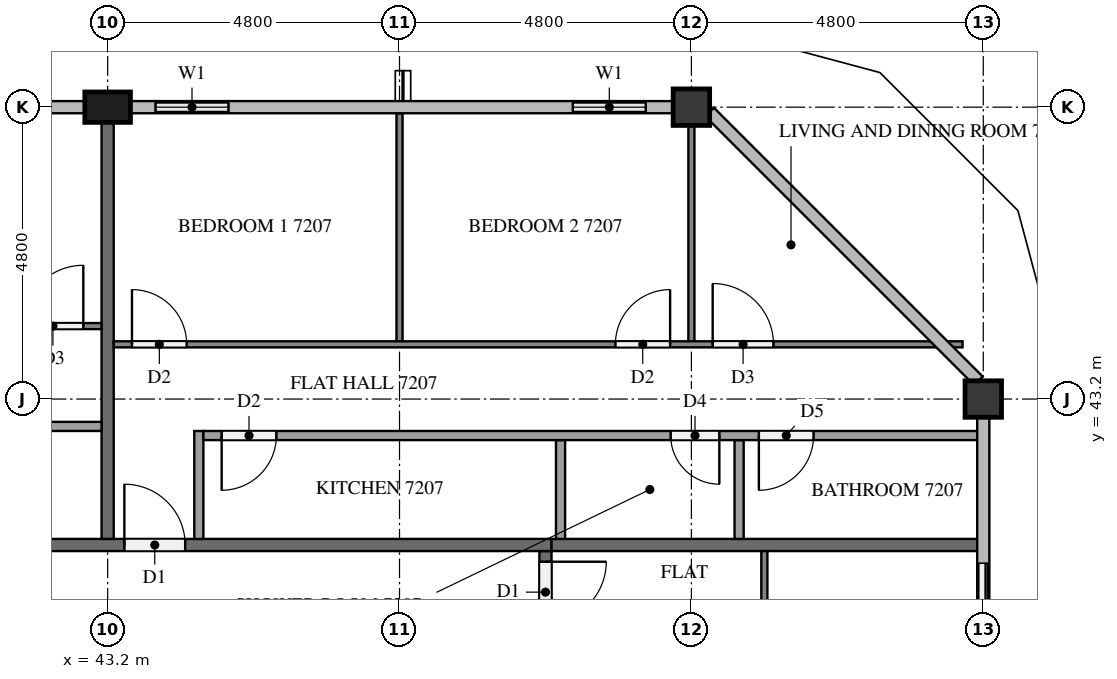
"""IFC4 building model, lengths in metres.
Left out: names, types, materials, properties, quantities, classifications, styles, units other than length and angle.
Written with IfcOpenShell. Run it as: python <this file> out.ifc"""

import sys

from ifc_helpers import new_model, si_unit, direction, frame, frame_2d, origin, origin_2d, place, context, subcontext, project, spatial, rectangle, extrude, element, fill, save


model = new_model("IFC4")
c1 = context("Model", 3, precision=1e-05, world=origin(), true_north=direction((0.0, 1.0)))
c2 = subcontext(c1, "Body", "Model", "MODEL_VIEW")
j1 = project(units=[si_unit("LENGTHUNIT", "METRE"), si_unit("PLANEANGLEUNIT", "RADIAN")], contexts=[c1])
p1 = place(None, origin())
s1 = spatial("IfcSite", under=j1, at=p1, CompositionType="ELEMENT")
p2 = place(p1, origin())
s2 = spatial("IfcBuilding", under=s1, at=p2, CompositionType="ELEMENT")
p3 = place(p2, frame((0.0, 0.0, 275.6)))
s3 = spatial("IfcBuildingStorey", under=s2, at=p3, CompositionType="ELEMENT", Elevation=275.6)
for number, where, z_axis, x_axis in (
    (1, (57.6, 43.2, 0.0), (0.0, 0.0, 1.0), (1.0, 0.0, 0.0)),
    (2, (52.8, 48.0, 0.0), (0.0, 0.0, 1.0), (1.0, 0.0, 0.0)),
):
    element("IfcColumn", number, at=place(p3, frame(where, z_axis=z_axis, x_axis=x_axis)), inside=s3, PredefinedType="COLUMN", context=c2, shape_type="SweptSolid", body=[
        extrude(rectangle(XDim=0.6, YDim=0.6, at=origin_2d()), origin(), (0.0, 0.0, 1.0), 3.2),
    ])
p4 = place(p3, frame((43.2, 48.0, 0.0), z_axis=(0.0, 0.0, 1.0), x_axis=(1.0, 0.0, 0.0)))
e3 = element("IfcColumn", 3, at=p4, inside=s3, PredefinedType="COLUMN", context=c2, shape_type="SweptSolid", body=[
    extrude(rectangle(XDim=0.75, YDim=0.5, at=origin_2d()), origin(), (0.0, 0.0, 1.0), 3.2),
])
p5 = place(p3, frame((57.6, 38.4, 0.0), z_axis=(0.0, 0.0, 1.0), x_axis=(0.0, 1.0, 0.0)))
e4 = element("IfcWall", 4, at=p5, inside=s3, PredefinedType="SOLIDWALL", context=c2, shape_type="SweptSolid", body=[
    extrude(rectangle(XDim=2.4, YDim=0.15, at=frame_2d((1.2, 0.0))), origin(), (0.0, 0.0, 1.0), 3.2),
])
p6 = place(p5, frame((0.3, 0.0, 0.0)))
e5 = element("IfcOpeningElement", 5, at=p6, cuts=e4, PredefinedType="OPENING", context=c2, shape_type="SweptSolid", body=[
    extrude(rectangle(XDim=1.8, YDim=2.4, at=frame_2d((0.9, 1.2))), frame((0.0, 0.085, 0.0), z_axis=(0.0, -1.0, 0.0), x_axis=(1.0, 0.0, 0.0)), (0.0, 0.0, 1.0), 0.17),
])
p7 = place(p3, frame((52.5, 48.0, 0.0), z_axis=(0.0, 0.0, 1.0), x_axis=(-1.0, 0.0, 0.0)))
e6 = element("IfcWall", 6, at=p7, inside=s3, PredefinedType="SOLIDWALL", context=c2, shape_type="SweptSolid", body=[
    extrude(rectangle(XDim=2.1, YDim=0.15, at=frame_2d((1.05, 0.0))), origin(), (0.0, 0.0, 1.0), 3.2),
])
p8 = place(p7, frame((0.45, 0.0, 0.9)))
e7 = element("IfcOpeningElement", 7, at=p8, cuts=e6, PredefinedType="OPENING", context=c2, shape_type="SweptSolid", body=[
    extrude(rectangle(XDim=1.2, YDim=1.4, at=frame_2d((0.6, 0.7))), frame((0.0, 0.085, 0.0), z_axis=(0.0, -1.0, 0.0), x_axis=(1.0, 0.0, 0.0)), (0.0, 0.0, 1.0), 0.17),
])
p9 = place(p3, frame((45.6, 48.0, 0.0), z_axis=(0.0, 0.0, 1.0), x_axis=(-1.0, 0.0, 0.0)))
e8 = element("IfcWall", 8, at=p9, inside=s3, PredefinedType="SOLIDWALL", context=c2, shape_type="SweptSolid", body=[
    extrude(rectangle(XDim=2.025, YDim=0.15, at=frame_2d((1.013, 0.0))), origin(), (0.0, 0.0, 1.0), 3.2),
])
p10 = place(p9, frame((0.413, 0.0, 0.9)))
e9 = element("IfcOpeningElement", 9, at=p10, cuts=e8, PredefinedType="OPENING", context=c2, shape_type="SweptSolid", body=[
    extrude(rectangle(XDim=1.2, YDim=1.4, at=frame_2d((0.6, 0.7))), frame((0.0, 0.085, 0.0), z_axis=(0.0, -1.0, 0.0), x_axis=(1.0, 0.0, 0.0)), (0.0, 0.0, 1.0), 0.17),
])
p11 = place(p3, frame((50.4, 40.7, 0.0), z_axis=(0.0, 0.0, 1.0), x_axis=(0.0, -1.0, 0.0)))
e10 = element("IfcWall", 10, at=p11, inside=s3, PredefinedType="PARTITIONING", context=c2, shape_type="SweptSolid", body=[
    extrude(rectangle(XDim=28.6, YDim=0.2, at=frame_2d((14.3, 0.0))), origin(), (0.0, 0.0, 1.0), 3.2),
])
p12 = place(p11, frame((27.425, 0.0, 0.0)))
e11 = element("IfcOpeningElement", 11, at=p12, cuts=e10, PredefinedType="OPENING", context=c2, shape_type="SweptSolid", body=[
    extrude(rectangle(XDim=1.0, YDim=2.1, at=frame_2d((0.5, 1.05))), frame((0.0, 0.11, 0.0), z_axis=(0.0, -1.0, 0.0), x_axis=(1.0, 0.0, 0.0)), (0.0, 0.0, 1.0), 0.22),
])
p13 = place(p11, frame((0.175, 0.0, 0.0)))
e12 = element("IfcOpeningElement", 12, at=p13, cuts=e10, PredefinedType="OPENING", context=c2, shape_type="SweptSolid", body=[
    extrude(rectangle(XDim=1.0, YDim=2.1, at=frame_2d((0.5, 1.05))), frame((0.0, 0.11, 0.0), z_axis=(0.0, -1.0, 0.0), x_axis=(1.0, 0.0, 0.0)), (0.0, 0.0, 1.0), 0.22),
])
p14 = place(p3, frame((11.9, 40.8, 0.0), z_axis=(0.0, 0.0, 1.0), x_axis=(1.0, 0.0, 0.0)))
e13 = element("IfcWall", 13, at=p14, inside=s3, PredefinedType="PARTITIONING", context=c2, shape_type="SweptSolid", body=[
    extrude(rectangle(XDim=38.6, YDim=0.2, at=frame_2d((19.3, 0.0))), origin(), (0.0, 0.0, 1.0), 3.2),
])
p15 = place(p14, frame((31.575, 0.0, 0.0)))
e14 = element("IfcOpeningElement", 14, at=p15, cuts=e13, PredefinedType="OPENING", context=c2, shape_type="SweptSolid", body=[
    extrude(rectangle(XDim=1.0, YDim=2.1, at=frame_2d((0.5, 1.05))), frame((0.0, 0.11, 0.0), z_axis=(0.0, -1.0, 0.0), x_axis=(1.0, 0.0, 0.0)), (0.0, 0.0, 1.0), 0.22),
])
p16 = place(p14, frame((24.375, 0.0, 0.0)))
e15 = element("IfcOpeningElement", 15, at=p16, cuts=e13, PredefinedType="OPENING", context=c2, shape_type="SweptSolid", body=[
    extrude(rectangle(XDim=1.0, YDim=2.1, at=frame_2d((0.5, 1.05))), frame((0.0, 0.11, 0.0), z_axis=(0.0, -1.0, 0.0), x_axis=(1.0, 0.0, 0.0)), (0.0, 0.0, 1.0), 0.22),
])
p17 = place(p14, frame((22.825, 0.0, 0.0)))
e16 = element("IfcOpeningElement", 16, at=p17, cuts=e13, PredefinedType="OPENING", context=c2, shape_type="SweptSolid", body=[
    extrude(rectangle(XDim=1.0, YDim=2.1, at=frame_2d((0.5, 1.05))), frame((0.0, 0.11, 0.0), z_axis=(0.0, -1.0, 0.0), x_axis=(1.0, 0.0, 0.0)), (0.0, 0.0, 1.0), 0.22),
])
p18 = place(p14, frame((0.375, 0.0, 0.0)))
e17 = element("IfcOpeningElement", 17, at=p18, cuts=e13, PredefinedType="OPENING", context=c2, shape_type="SweptSolid", body=[
    extrude(rectangle(XDim=1.0, YDim=2.1, at=frame_2d((0.5, 1.05))), frame((0.0, 0.11, 0.0), z_axis=(0.0, -1.0, 0.0), x_axis=(1.0, 0.0, 0.0)), (0.0, 0.0, 1.0), 0.22),
])
p19 = place(p3, frame((50.5, 40.8, 0.0), z_axis=(0.0, 0.0, 1.0), x_axis=(1.0, 0.0, 0.0)))
e18 = element("IfcWall", 18, at=p19, inside=s3, PredefinedType="PARTITIONING", context=c2, shape_type="SweptSolid", body=[
    extrude(rectangle(XDim=7.0, YDim=0.2, at=frame_2d((3.5, 0.0))), origin(), (0.0, 0.0, 1.0), 3.2),
])
p20 = place(p3, frame((43.2, 47.75, 0.0), z_axis=(0.0, 0.0, 1.0), x_axis=(0.0, -1.0, 0.0)))
e19 = element("IfcWall", 19, at=p20, inside=s3, PredefinedType="PARTITIONING", context=c2, shape_type="SweptSolid", body=[
    extrude(rectangle(XDim=6.85, YDim=0.2, at=frame_2d((3.425, 0.0))), origin(), (0.0, 0.0, 1.0), 3.2),
])
p21 = place(p3, frame((54.0, 40.7, 0.0), z_axis=(0.0, 0.0, 1.0), x_axis=(0.0, -1.0, 0.0)))
e20 = element("IfcWall", 20, at=p21, inside=s3, PredefinedType="PARTITIONING", context=c2, shape_type="SweptSolid", body=[
    extrude(rectangle(XDim=11.8, YDim=0.1, at=frame_2d((5.9, 0.0))), origin(), (0.0, 0.0, 1.0), 3.2),
])
p22 = place(p21, frame((5.75, 0.0, 0.0)))
e21 = element("IfcOpeningElement", 21, at=p22, cuts=e20, PredefinedType="OPENING", context=c2, shape_type="SweptSolid", body=[
    extrude(rectangle(XDim=1.0, YDim=2.1, at=frame_2d((0.5, 1.05))), frame((0.0, 0.06, 0.0), z_axis=(0.0, -1.0, 0.0), x_axis=(1.0, 0.0, 0.0)), (0.0, 0.0, 1.0), 0.12),
])
p23 = place(p21, frame((7.45, 0.0, 0.0)))
e22 = element("IfcOpeningElement", 22, at=p23, cuts=e20, PredefinedType="OPENING", context=c2, shape_type="SweptSolid", body=[
    extrude(rectangle(XDim=0.9, YDim=2.1, at=frame_2d((0.45, 1.05))), frame((0.0, 0.06, 0.0), z_axis=(0.0, -1.0, 0.0), x_axis=(1.0, 0.0, 0.0)), (0.0, 0.0, 1.0), 0.12),
])
p24 = place(p3, frame((48.0, 44.15, 0.0), z_axis=(0.0, 0.0, 1.0), x_axis=(0.0, 1.0, 0.0)))
e23 = element("IfcWall", 23, at=p24, inside=s3, PredefinedType="PARTITIONING", context=c2, shape_type="SweptSolid", body=[
    extrude(rectangle(XDim=3.75, YDim=0.1, at=frame_2d((1.875, 0.0))), origin(), (0.0, 0.0, 1.0), 3.2),
])
p25 = place(p3, frame((52.8, 44.15, 0.0), z_axis=(0.0, 0.0, 1.0), x_axis=(0.0, 1.0, 0.0)))
e24 = element("IfcWall", 24, at=p25, inside=s3, PredefinedType="PARTITIONING", context=c2, shape_type="SweptSolid", body=[
    extrude(rectangle(XDim=3.55, YDim=0.1, at=frame_2d((1.775, 0.0))), origin(), (0.0, 0.0, 1.0), 3.2),
])
p26 = place(p3, frame((43.3, 44.1, 0.0), z_axis=(0.0, 0.0, 1.0), x_axis=(1.0, 0.0, 0.0)))
e25 = element("IfcWall", 25, at=p26, inside=s3, PredefinedType="PARTITIONING", context=c2, shape_type="SweptSolid", body=[
    extrude(rectangle(XDim=13.959, YDim=0.1, at=frame_2d((6.979, 0.0))), origin(), (0.0, 0.0, 1.0), 3.2),
])
p27 = place(p26, frame((0.3, 0.0, 0.0)))
e26 = element("IfcOpeningElement", 26, at=p27, cuts=e25, PredefinedType="OPENING", context=c2, shape_type="SweptSolid", body=[
    extrude(rectangle(XDim=0.9, YDim=2.1, at=frame_2d((0.45, 1.05))), frame((0.0, 0.06, 0.0), z_axis=(0.0, -1.0, 0.0), x_axis=(1.0, 0.0, 0.0)), (0.0, 0.0, 1.0), 0.12),
])
p28 = place(p26, frame((8.25, 0.0, 0.0)))
e27 = element("IfcOpeningElement", 27, at=p28, cuts=e25, PredefinedType="OPENING", context=c2, shape_type="SweptSolid", body=[
    extrude(rectangle(XDim=0.9, YDim=2.1, at=frame_2d((0.45, 1.05))), frame((0.0, 0.06, 0.0), z_axis=(0.0, -1.0, 0.0), x_axis=(1.0, 0.0, 0.0)), (0.0, 0.0, 1.0), 0.12),
])
p29 = place(p26, frame((9.85, 0.0, 0.0)))
e28 = element("IfcOpeningElement", 28, at=p29, cuts=e25, PredefinedType="OPENING", context=c2, shape_type="SweptSolid", body=[
    extrude(rectangle(XDim=1.0, YDim=2.1, at=frame_2d((0.5, 1.05))), frame((0.0, 0.06, 0.0), z_axis=(0.0, -1.0, 0.0), x_axis=(1.0, 0.0, 0.0)), (0.0, 0.0, 1.0), 0.12),
])
for number, where, z_axis, x_axis in (
    (29, (50.648, 40.9, 0.0), (0.0, 0.0, 1.0), (0.0, 1.0, 0.0)),
    (30, (53.585, 40.9, 0.0), (0.0, 0.0, 1.0), (0.0, 1.0, 0.0)),
):
    element("IfcWall", number, at=place(p3, frame(where, z_axis=z_axis, x_axis=x_axis)), inside=s3, PredefinedType="PARTITIONING", context=c2, shape_type="SweptSolid", body=[
        extrude(rectangle(XDim=1.625, YDim=0.15, at=frame_2d((0.812, 0.0))), origin(), (0.0, 0.0, 1.0), 3.2),
    ])
p30 = place(p3, frame((44.7, 40.9, 0.0), z_axis=(0.0, 0.0, 1.0), x_axis=(0.0, 1.0, 0.0)))
e31 = element("IfcWall", 31, at=p30, inside=s3, PredefinedType="PARTITIONING", context=c2, shape_type="SweptSolid", body=[
    extrude(rectangle(XDim=1.775, YDim=0.15, at=frame_2d((0.888, 0.0))), origin(), (0.0, 0.0, 1.0), 3.2),
])
p31 = place(p3, frame((57.5, 42.6, 0.0), z_axis=(0.0, 0.0, 1.0), x_axis=(-1.0, 0.0, 0.0)))
e32 = element("IfcWall", 32, at=p31, inside=s3, PredefinedType="PARTITIONING", context=c2, shape_type="SweptSolid", body=[
    extrude(rectangle(XDim=12.725, YDim=0.15, at=frame_2d((6.363, 0.0))), origin(), (0.0, 0.0, 1.0), 3.2),
])
p32 = place(p31, frame((11.525, 0.0, 0.0)))
e33 = element("IfcOpeningElement", 33, at=p32, cuts=e32, PredefinedType="OPENING", context=c2, shape_type="SweptSolid", body=[
    extrude(rectangle(XDim=0.9, YDim=2.1, at=frame_2d((0.45, 1.05))), frame((0.0, 0.085, 0.0), z_axis=(0.0, -1.0, 0.0), x_axis=(1.0, 0.0, 0.0)), (0.0, 0.0, 1.0), 0.17),
])
p33 = place(p31, frame((4.24, 0.0, 0.0)))
e34 = element("IfcOpeningElement", 34, at=p33, cuts=e32, PredefinedType="OPENING", context=c2, shape_type="SweptSolid", body=[
    extrude(rectangle(XDim=0.8, YDim=2.1, at=frame_2d((0.4, 1.05))), frame((0.0, 0.085, 0.0), z_axis=(0.0, -1.0, 0.0), x_axis=(1.0, 0.0, 0.0)), (0.0, 0.0, 1.0), 0.17),
])
p34 = place(p31, frame((2.69, 0.0, 0.0)))
e35 = element("IfcOpeningElement", 35, at=p34, cuts=e32, PredefinedType="OPENING", context=c2, shape_type="SweptSolid", body=[
    extrude(rectangle(XDim=0.9, YDim=2.1, at=frame_2d((0.45, 1.05))), frame((0.0, 0.085, 0.0), z_axis=(0.0, -1.0, 0.0), x_axis=(1.0, 0.0, 0.0)), (0.0, 0.0, 1.0), 0.17),
])
p35 = place(p3, frame((36.1, 44.4, 0.0), z_axis=(0.0, 0.0, 1.0), x_axis=(1.0, 0.0, 0.0)))
e36 = element("IfcWall", 36, at=p35, inside=s3, PredefinedType="PARTITIONING", context=c2, shape_type="SweptSolid", body=[
    extrude(rectangle(XDim=7.0, YDim=0.1, at=frame_2d((3.5, 0.0))), origin(), (0.0, 0.0, 1.0), 3.2),
])
p36 = place(p35, frame((5.7, 0.0, 0.0)))
e37 = element("IfcOpeningElement", 37, at=p36, cuts=e36, PredefinedType="OPENING", context=c2, shape_type="SweptSolid", body=[
    extrude(rectangle(XDim=1.0, YDim=2.1, at=frame_2d((0.5, 1.05))), frame((0.0, 0.06, 0.0), z_axis=(0.0, -1.0, 0.0), x_axis=(1.0, 0.0, 0.0)), (0.0, 0.0, 1.0), 0.12),
])
p37 = place(p3, frame((43.1, 42.75, 0.0), z_axis=(0.0, 0.0, 1.0), x_axis=(-1.0, 0.0, 0.0)))
e38 = element("IfcWall", 38, at=p37, inside=s3, PredefinedType="PARTITIONING", context=c2, shape_type="SweptSolid", body=[
    extrude(rectangle(XDim=5.525, YDim=0.15, at=frame_2d((2.763, 0.0))), origin(), (0.0, 0.0, 1.0), 3.2),
])
p38 = place(p37, frame((3.64, 0.0, 0.0)))
e39 = element("IfcOpeningElement", 39, at=p38, cuts=e38, PredefinedType="OPENING", context=c2, shape_type="SweptSolid", body=[
    extrude(rectangle(XDim=0.8, YDim=2.1, at=frame_2d((0.4, 1.05))), frame((0.0, 0.085, 0.0), z_axis=(0.0, -1.0, 0.0), x_axis=(1.0, 0.0, 0.0)), (0.0, 0.0, 1.0), 0.17),
])
p39 = place(p37, frame((2.09, 0.0, 0.0)))
e40 = element("IfcOpeningElement", 40, at=p39, cuts=e38, PredefinedType="OPENING", context=c2, shape_type="SweptSolid", body=[
    extrude(rectangle(XDim=0.9, YDim=2.1, at=frame_2d((0.45, 1.05))), frame((0.0, 0.085, 0.0), z_axis=(0.0, -1.0, 0.0), x_axis=(1.0, 0.0, 0.0)), (0.0, 0.0, 1.0), 0.17),
])
p40 = place(p6, origin())
e41 = element("IfcDoor", 41, at=p40, inside=s3, OperationType="SLIDING_TO_LEFT", PredefinedType="DOOR", context=c2, shape_type="SweptSolid", body=[
    extrude(rectangle(XDim=1.8, YDim=2.4, at=frame_2d((0.9, 1.2))), frame((0.0, 0.025, 0.0), z_axis=(0.0, -1.0, 0.0), x_axis=(1.0, 0.0, 0.0)), (0.0, 0.0, 1.0), 0.05),
])
fill(e5, e41)
p41 = place(p8, origin())
e42 = element("IfcWindow", 42, at=p41, inside=s3, PartitioningType="SINGLE_PANEL", PredefinedType="WINDOW", context=c2, shape_type="SweptSolid", body=[
    extrude(rectangle(XDim=1.2, YDim=1.4, at=frame_2d((0.6, 0.7))), frame((0.0, 0.03, 0.0), z_axis=(0.0, -1.0, 0.0), x_axis=(1.0, 0.0, 0.0)), (0.0, 0.0, 1.0), 0.06),
])
fill(e7, e42)
p42 = place(p10, origin())
e43 = element("IfcWindow", 43, at=p42, inside=s3, PartitioningType="SINGLE_PANEL", PredefinedType="WINDOW", context=c2, shape_type="SweptSolid", body=[
    extrude(rectangle(XDim=1.2, YDim=1.4, at=frame_2d((0.6, 0.7))), frame((0.0, 0.03, 0.0), z_axis=(0.0, -1.0, 0.0), x_axis=(1.0, 0.0, 0.0)), (0.0, 0.0, 1.0), 0.06),
])
fill(e9, e43)
p43 = place(p13, origin())
e44 = element("IfcDoor", 44, at=p43, inside=s3, OperationType="SINGLE_SWING_LEFT", PredefinedType="DOOR", context=c2, shape_type="SweptSolid", body=[
    extrude(rectangle(XDim=1.0, YDim=2.1, at=frame_2d((0.5, 1.05))), frame((0.0, 0.025, 0.0), z_axis=(0.0, -1.0, 0.0), x_axis=(1.0, 0.0, 0.0)), (0.0, 0.0, 1.0), 0.05),
])
fill(e12, e44)
p44 = place(p15, origin())
e45 = element("IfcDoor", 45, at=p44, inside=s3, OperationType="SINGLE_SWING_LEFT", PredefinedType="DOOR", context=c2, shape_type="SweptSolid", body=[
    extrude(rectangle(XDim=1.0, YDim=2.1, at=frame_2d((0.5, 1.05))), frame((0.0, 0.025, 0.0), z_axis=(0.0, -1.0, 0.0), x_axis=(1.0, 0.0, 0.0)), (0.0, 0.0, 1.0), 0.05),
])
fill(e14, e45)
p45 = place(p27, origin())
e46 = element("IfcDoor", 46, at=p45, inside=s3, OperationType="SINGLE_SWING_LEFT", PredefinedType="DOOR", context=c2, shape_type="SweptSolid", body=[
    extrude(rectangle(XDim=0.9, YDim=2.1, at=frame_2d((0.45, 1.05))), frame((0.0, 0.025, 0.0), z_axis=(0.0, -1.0, 0.0), x_axis=(1.0, 0.0, 0.0)), (0.0, 0.0, 1.0), 0.05),
])
fill(e26, e46)
p46 = place(p28, origin())
e47 = element("IfcDoor", 47, at=p46, inside=s3, OperationType="SINGLE_SWING_RIGHT", PredefinedType="DOOR", context=c2, shape_type="SweptSolid", body=[
    extrude(rectangle(XDim=0.9, YDim=2.1, at=frame_2d((0.45, 1.05))), frame((0.0, 0.025, 0.0), z_axis=(0.0, -1.0, 0.0), x_axis=(1.0, 0.0, 0.0)), (0.0, 0.0, 1.0), 0.05),
])
fill(e27, e47)
p47 = place(p29, origin())
e48 = element("IfcDoor", 48, at=p47, inside=s3, OperationType="SINGLE_SWING_LEFT", PredefinedType="DOOR", context=c2, shape_type="SweptSolid", body=[
    extrude(rectangle(XDim=1.0, YDim=2.1, at=frame_2d((0.5, 1.05))), frame((0.0, 0.025, 0.0), z_axis=(0.0, -1.0, 0.0), x_axis=(1.0, 0.0, 0.0)), (0.0, 0.0, 1.0), 0.05),
])
fill(e28, e48)
p48 = place(p32, origin())
e49 = element("IfcDoor", 49, at=p48, inside=s3, OperationType="SINGLE_SWING_RIGHT", PredefinedType="DOOR", context=c2, shape_type="SweptSolid", body=[
    extrude(rectangle(XDim=0.9, YDim=2.1, at=frame_2d((0.45, 1.05))), frame((0.0, 0.025, 0.0), z_axis=(0.0, -1.0, 0.0), x_axis=(1.0, 0.0, 0.0)), (0.0, 0.0, 1.0), 0.05),
])
fill(e33, e49)
p49 = place(p33, origin())
e50 = element("IfcDoor", 50, at=p49, inside=s3, OperationType="SINGLE_SWING_LEFT", PredefinedType="DOOR", context=c2, shape_type="SweptSolid", body=[
    extrude(rectangle(XDim=0.8, YDim=2.1, at=frame_2d((0.4, 1.05))), frame((0.0, 0.025, 0.0), z_axis=(0.0, -1.0, 0.0), x_axis=(1.0, 0.0, 0.0)), (0.0, 0.0, 1.0), 0.05),
])
fill(e34, e50)
p50 = place(p34, origin())
e51 = element("IfcDoor", 51, at=p50, inside=s3, OperationType="SINGLE_SWING_RIGHT", PredefinedType="DOOR", context=c2, shape_type="SweptSolid", body=[
    extrude(rectangle(XDim=0.9, YDim=2.1, at=frame_2d((0.45, 1.05))), frame((0.0, 0.025, 0.0), z_axis=(0.0, -1.0, 0.0), x_axis=(1.0, 0.0, 0.0)), (0.0, 0.0, 1.0), 0.05),
])
fill(e35, e51)
p51 = place(p36, origin())
e52 = element("IfcDoor", 52, at=p51, inside=s3, OperationType="SINGLE_SWING_RIGHT", PredefinedType="DOOR", context=c2, shape_type="SweptSolid", body=[
    extrude(rectangle(XDim=1.0, YDim=2.1, at=frame_2d((0.5, 1.05))), frame((0.0, 0.025, 0.0), z_axis=(0.0, -1.0, 0.0), x_axis=(1.0, 0.0, 0.0)), (0.0, 0.0, 1.0), 0.05),
])
fill(e37, e52)
save(model, sys.argv[1])
